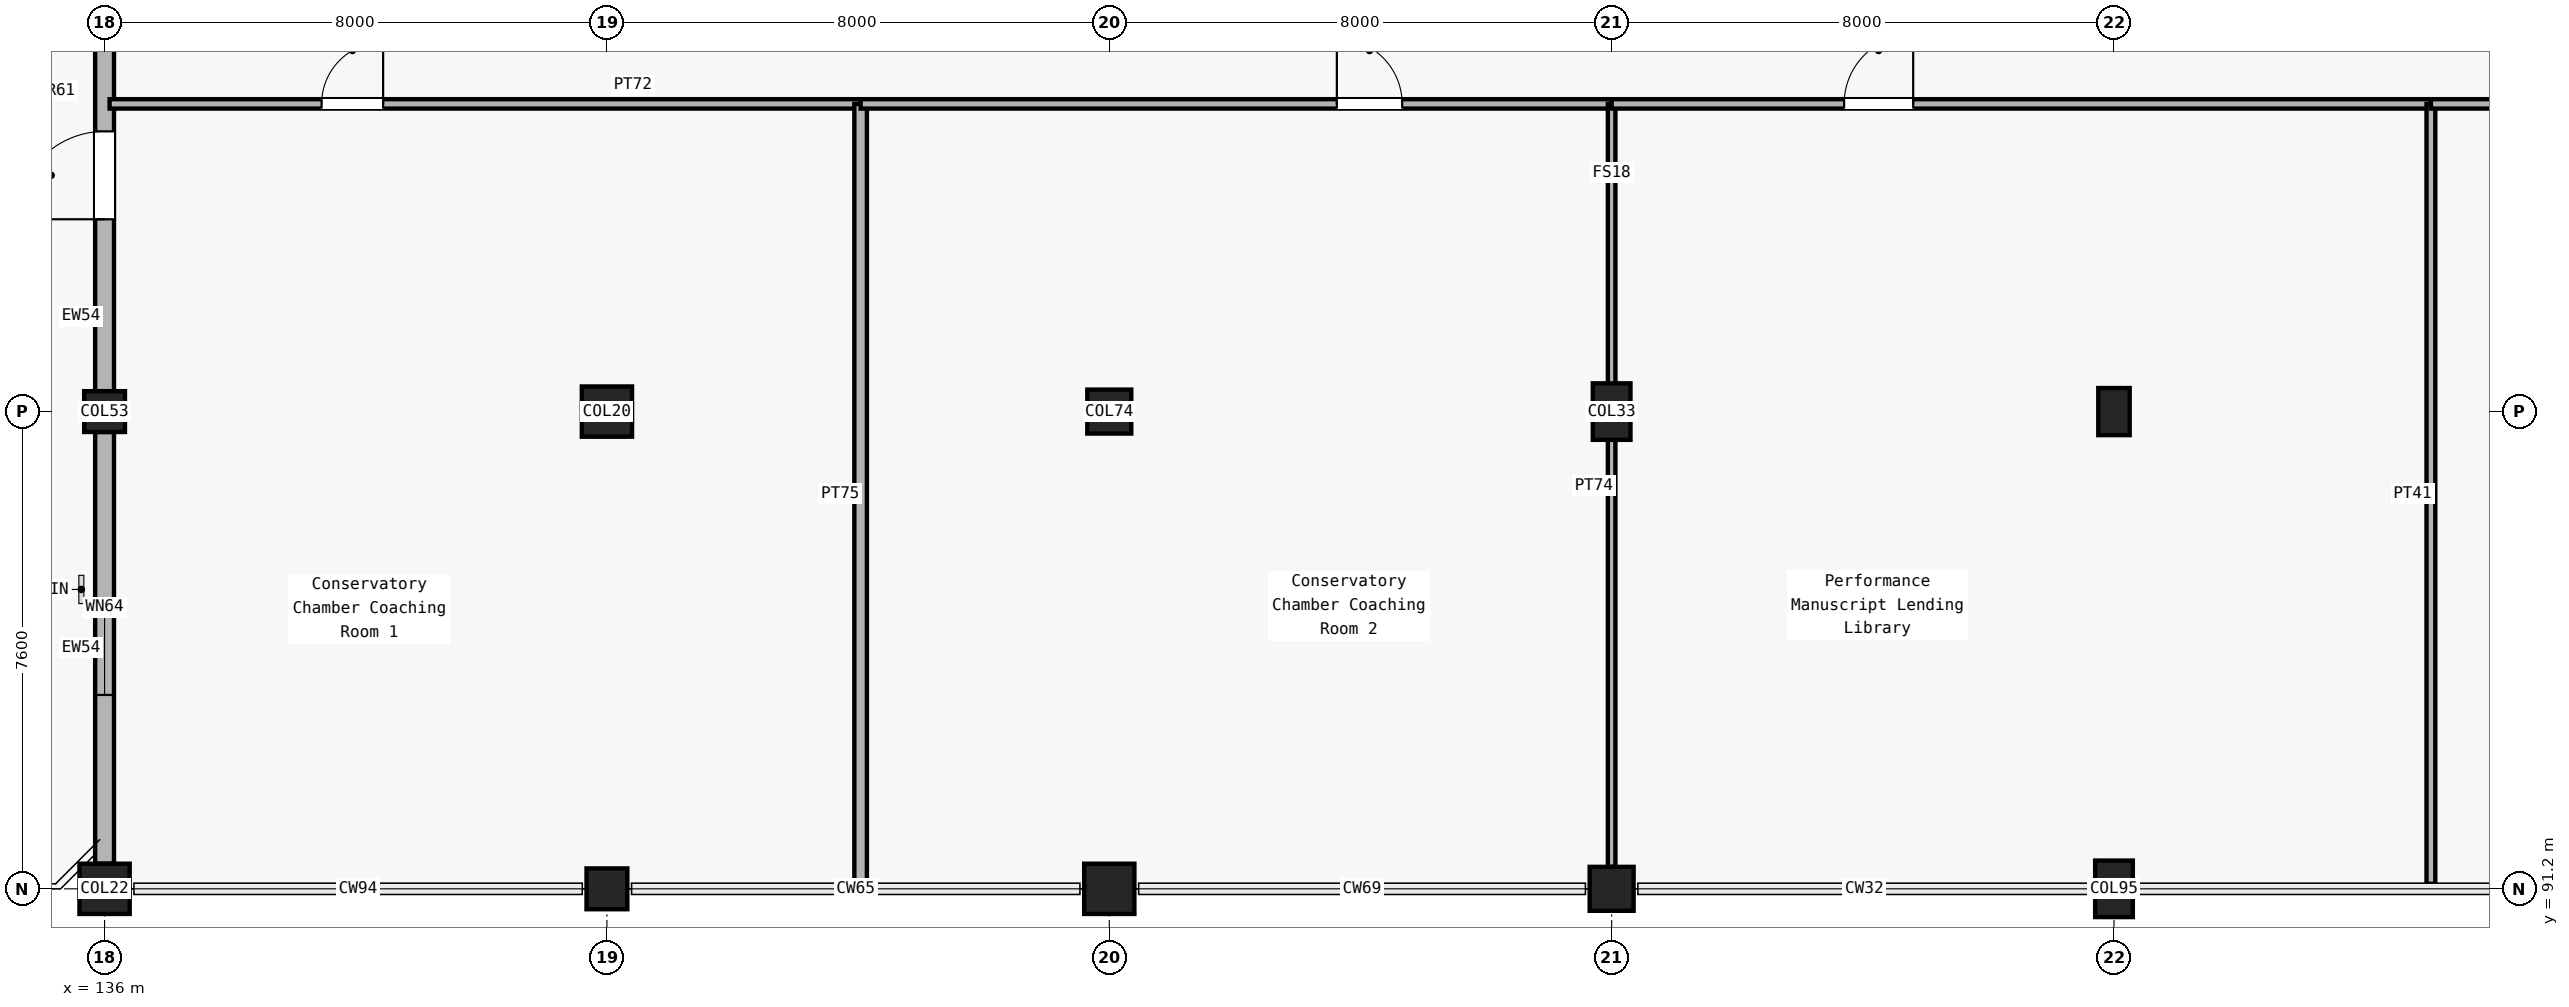
"""IFC4 building model, lengths in metres.
Left out: names, types, materials, properties, quantities, classifications, styles, units other than length and angle.
Written with IfcOpenShell. Run it as: python <this file> out.ifc"""

import sys

from ifc_helpers import new_model, si_unit, direction, frame, frame_2d, origin, origin_2d, place, context, subcontext, project, spatial, rectangle, circle, extrude, element, fill, save


model = new_model("IFC4")
c1 = context("Model", 3, precision=1e-05, world=origin(), true_north=direction((0.0, 1.0)))
c2 = subcontext(c1, "Body", "Model", "MODEL_VIEW")
j1 = project(units=[si_unit("LENGTHUNIT", "METRE"), si_unit("PLANEANGLEUNIT", "RADIAN")], contexts=[c1])
p1 = place(None, origin())
s1 = spatial("IfcSite", under=j1, at=p1, CompositionType="ELEMENT")
p2 = place(p1, origin())
s2 = spatial("IfcBuilding", under=s1, at=p2, CompositionType="ELEMENT")
p3 = place(p2, frame((0.0, 0.0, 15.0)))
s3 = spatial("IfcBuildingStorey", under=s2, at=p3, CompositionType="ELEMENT", Elevation=15.0)
p4 = place(p3, frame((136.0, 91.2, 0.0), z_axis=(0.0, 0.0, 1.0), x_axis=(1.0, 0.0, 0.0)))
e1 = element("IfcColumn", 1, at=p4, inside=s3, PredefinedType="COLUMN", context=c2, shape_type="SweptSolid", body=[
    extrude(circle(Radius=0.4, at=origin_2d()), origin(), (0.0, 0.0, 1.0), 4.8),
])
for number, where, z_axis, x_axis in (
    (2, (136.0, 98.8, 0.0), (0.0, 0.0, 1.0), (1.0, 0.0, 0.0)),
    (3, (144.0, 91.2, 0.0), (0.0, 0.0, 1.0), (1.0, 0.0, 0.0)),
):
    element("IfcColumn", number, at=place(p3, frame(where, z_axis=z_axis, x_axis=x_axis)), inside=s3, PredefinedType="COLUMN", context=c2, shape_type="SweptSolid", body=[
        extrude(circle(Radius=0.325, at=origin_2d()), origin(), (0.0, 0.0, 1.0), 4.8),
    ])
for number, where, z_axis, x_axis in (
    (4, (144.0, 98.8, 0.0), (0.0, 0.0, 1.0), (1.0, 0.0, 0.0)),
    (5, (152.0, 91.2, 0.0), (0.0, 0.0, 1.0), (1.0, 0.0, 0.0)),
):
    element("IfcColumn", number, at=place(p3, frame(where, z_axis=z_axis, x_axis=x_axis)), inside=s3, PredefinedType="COLUMN", context=c2, shape_type="SweptSolid", body=[
        extrude(rectangle(XDim=0.8, YDim=0.8, at=origin_2d()), origin(), (0.0, 0.0, 1.0), 4.8),
    ])
for number, where, z_axis, x_axis in (
    (6, (152.0, 98.8, 0.0), (0.0, 0.0, 1.0), (1.0, 0.0, 0.0)),
    (7, (160.0, 91.2, 0.0), (0.0, 0.0, 1.0), (1.0, 0.0, 0.0)),
):
    element("IfcColumn", number, at=place(p3, frame(where, z_axis=z_axis, x_axis=x_axis)), inside=s3, PredefinedType="COLUMN", context=c2, shape_type="SweptSolid", body=[
        extrude(rectangle(XDim=0.7, YDim=0.7, at=origin_2d()), origin(), (0.0, 0.0, 1.0), 4.8),
    ])
for number, where, z_axis, x_axis in (
    (8, (160.0, 98.8, 0.0), (0.0, 0.0, 1.0), (1.0, 0.0, 0.0)),
    (9, (168.0, 91.2, 0.0), (0.0, 0.0, 1.0), (1.0, 0.0, 0.0)),
):
    element("IfcColumn", number, at=place(p3, frame(where, z_axis=z_axis, x_axis=x_axis)), inside=s3, PredefinedType="COLUMN", context=c2, shape_type="SweptSolid", body=[
        extrude(rectangle(XDim=0.6, YDim=0.9, at=origin_2d()), origin(), (0.0, 0.0, 1.0), 4.8),
    ])
p5 = place(p3, frame((168.0, 98.8, 0.0), z_axis=(0.0, 0.0, 1.0), x_axis=(1.0, 0.0, 0.0)))
e10 = element("IfcColumn", 10, at=p5, inside=s3, PredefinedType="COLUMN", context=c2, shape_type="SweptSolid", body=[
    extrude(rectangle(XDim=0.5, YDim=0.75, at=origin_2d()), origin(), (0.0, 0.0, 1.0), 4.8),
])
p6 = place(p3, frame((136.0, 91.6, 0.0), z_axis=(0.0, 0.0, 1.0), x_axis=(0.0, 1.0, 0.0)))
e11 = element("IfcWall", 11, at=p6, inside=s3, PredefinedType="SOLIDWALL", context=c2, shape_type="SweptSolid", body=[
    extrude(rectangle(XDim=6.875, YDim=0.3, at=frame_2d((3.438, 0.0))), origin(), (0.0, 0.0, 1.0), 3.87),
])
p7 = place(p6, frame((2.688, 0.0, 0.95)))
e12 = element("IfcOpeningElement", 12, at=p7, cuts=e11, PredefinedType="OPENING", context=c2, shape_type="SweptSolid", body=[
    extrude(rectangle(XDim=1.5, YDim=1.8, at=frame_2d((0.75, 0.9))), frame((0.0, 0.16, 0.0), z_axis=(0.0, -1.0, 0.0), x_axis=(1.0, 0.0, 0.0)), (0.0, 0.0, 1.0), 0.32),
])
p8 = place(p3, frame((136.0, 99.125, 0.0), z_axis=(0.0, 0.0, 1.0), x_axis=(0.0, 1.0, 0.0)))
e13 = element("IfcWall", 13, at=p8, inside=s3, PredefinedType="SOLIDWALL", context=c2, shape_type="SweptSolid", body=[
    extrude(rectangle(XDim=6.875, YDim=0.3, at=frame_2d((3.438, 0.0))), origin(), (0.0, 0.0, 1.0), 3.57),
])
p9 = place(p8, frame((2.738, 0.0, 0.0)))
e14 = element("IfcOpeningElement", 14, at=p9, cuts=e13, PredefinedType="OPENING", context=c2, shape_type="SweptSolid", body=[
    extrude(rectangle(XDim=1.4, YDim=2.2, at=frame_2d((0.7, 1.1))), frame((0.0, 0.16, 0.0), z_axis=(0.0, -1.0, 0.0), x_axis=(1.0, 0.0, 0.0)), (0.0, 0.0, 1.0), 0.32),
])
p10 = place(p3, frame((136.08, 103.7, 0.0), z_axis=(0.0, 0.0, 1.0), x_axis=(1.0, 0.0, 0.0)))
e15 = element("IfcWall", 15, at=p10, inside=s3, PredefinedType="PARTITIONING", context=c2, shape_type="SweptSolid", body=[
    extrude(rectangle(XDim=11.96, YDim=0.15, at=frame_2d((5.98, 0.0))), origin(), (0.0, 0.0, 1.0), 3.755),
])
p11 = place(p10, frame((3.376, 0.0, 0.0)))
e16 = element("IfcOpeningElement", 16, at=p11, cuts=e15, PredefinedType="OPENING", context=c2, shape_type="SweptSolid", body=[
    extrude(rectangle(XDim=0.98, YDim=2.15, at=frame_2d((0.49, 1.075))), frame((0.0, 0.085, 0.0), z_axis=(0.0, -1.0, 0.0), x_axis=(1.0, 0.0, 0.0)), (0.0, 0.0, 1.0), 0.17),
])
p12 = place(p3, frame((148.04, 91.28, 0.0), z_axis=(0.0, 0.0, 1.0), x_axis=(0.0, 1.0, 0.0)))
e17 = element("IfcWall", 17, at=p12, inside=s3, PredefinedType="PARTITIONING", context=c2, shape_type="SweptSolid", body=[
    extrude(rectangle(XDim=12.42, YDim=0.2, at=frame_2d((6.21, 0.0))), origin(), (0.0, 0.0, 1.0), 3.605),
])
p13 = place(p3, frame((148.04, 103.7, 0.0), z_axis=(0.0, 0.0, 1.0), x_axis=(1.0, 0.0, 0.0)))
e18 = element("IfcWall", 18, at=p13, inside=s3, PredefinedType="PARTITIONING", context=c2, shape_type="SweptSolid", body=[
    extrude(rectangle(XDim=11.96, YDim=0.15, at=frame_2d((5.98, 0.0))), origin(), (0.0, 0.0, 1.0), 3.705),
])
p14 = place(p13, frame((7.584, 0.0, 0.0)))
e19 = element("IfcOpeningElement", 19, at=p14, cuts=e18, PredefinedType="OPENING", context=c2, shape_type="SweptSolid", body=[
    extrude(rectangle(XDim=1.04, YDim=2.15, at=frame_2d((0.52, 1.075))), frame((0.0, 0.085, 0.0), z_axis=(0.0, -1.0, 0.0), x_axis=(1.0, 0.0, 0.0)), (0.0, 0.0, 1.0), 0.17),
])
p15 = place(p3, frame((160.0, 91.55, 0.0), z_axis=(0.0, 0.0, 1.0), x_axis=(0.0, 1.0, 0.0)))
e20 = element("IfcWall", 20, at=p15, inside=s3, PredefinedType="PARTITIONING", context=c2, shape_type="SweptSolid", body=[
    extrude(rectangle(XDim=12.15, YDim=0.12, at=frame_2d((6.075, 0.0))), origin(), (0.0, 0.0, 1.0), 3.705),
])
p16 = place(p3, frame((160.0, 103.7, 0.0), z_axis=(0.0, 0.0, 1.0), x_axis=(1.0, 0.0, 0.0)))
e21 = element("IfcWall", 21, at=p16, inside=s3, PredefinedType="PARTITIONING", context=c2, shape_type="SweptSolid", body=[
    extrude(rectangle(XDim=13.047, YDim=0.15, at=frame_2d((6.523, 0.0))), origin(), (0.0, 0.0, 1.0), 3.855),
])
p17 = place(p16, frame((3.702, 0.0, 0.0)))
e22 = element("IfcOpeningElement", 22, at=p17, cuts=e21, PredefinedType="OPENING", context=c2, shape_type="SweptSolid", body=[
    extrude(rectangle(XDim=1.1, YDim=2.15, at=frame_2d((0.55, 1.075))), frame((0.0, 0.085, 0.0), z_axis=(0.0, -1.0, 0.0), x_axis=(1.0, 0.0, 0.0)), (0.0, 0.0, 1.0), 0.17),
])
p18 = place(p3, frame((173.047, 91.28, 0.0), z_axis=(0.0, 0.0, 1.0), x_axis=(0.0, 1.0, 0.0)))
e23 = element("IfcWall", 23, at=p18, inside=s3, PredefinedType="PARTITIONING", context=c2, shape_type="SweptSolid", body=[
    extrude(rectangle(XDim=12.42, YDim=0.14, at=frame_2d((6.21, 0.0))), origin(), (0.0, 0.0, 1.0), 3.78),
])
p19 = place(p3, frame((173.047, 103.7, 0.0), z_axis=(0.0, 0.0, 1.0), x_axis=(1.0, 0.0, 0.0)))
e24 = element("IfcWall", 24, at=p19, inside=s3, PredefinedType="PARTITIONING", context=c2, shape_type="SweptSolid", body=[
    extrude(rectangle(XDim=10.873, YDim=0.15, at=frame_2d((5.437, 0.0))), origin(), (0.0, 0.0, 1.0), 3.78),
])
p20 = place(p19, frame((6.823, 0.0, 0.0)))
e25 = element("IfcOpeningElement", 25, at=p20, cuts=e24, PredefinedType="OPENING", context=c2, shape_type="SweptSolid", body=[
    extrude(rectangle(XDim=1.22, YDim=2.15, at=frame_2d((0.61, 1.075))), frame((0.0, 0.085, 0.0), z_axis=(0.0, -1.0, 0.0), x_axis=(1.0, 0.0, 0.0)), (0.0, 0.0, 1.0), 0.17),
])
p21 = place(p7, origin())
e26 = element("IfcWindow", 26, at=p21, inside=s3, PartitioningType="SINGLE_PANEL", PredefinedType="WINDOW", context=c2, shape_type="SweptSolid", body=[
    extrude(rectangle(XDim=1.5, YDim=1.8, at=frame_2d((0.75, 0.9))), frame((0.0, 0.03, 0.0), z_axis=(0.0, -1.0, 0.0), x_axis=(1.0, 0.0, 0.0)), (0.0, 0.0, 1.0), 0.06),
])
fill(e12, e26)
p22 = place(p9, origin())
e27 = element("IfcDoor", 27, at=p22, inside=s3, OperationType="SINGLE_SWING_LEFT", PredefinedType="DOOR", context=c2, shape_type="SweptSolid", body=[
    extrude(rectangle(XDim=1.4, YDim=2.2, at=frame_2d((0.7, 1.1))), frame((0.0, 0.025, 0.0), z_axis=(0.0, -1.0, 0.0), x_axis=(1.0, 0.0, 0.0)), (0.0, 0.0, 1.0), 0.05),
])
fill(e14, e27)
p23 = place(p11, origin())
e28 = element("IfcDoor", 28, at=p23, inside=s3, OperationType="SINGLE_SWING_RIGHT", PredefinedType="DOOR", context=c2, shape_type="SweptSolid", body=[
    extrude(rectangle(XDim=0.98, YDim=2.15, at=frame_2d((0.49, 1.075))), frame((0.0, 0.025, 0.0), z_axis=(0.0, -1.0, 0.0), x_axis=(1.0, 0.0, 0.0)), (0.0, 0.0, 1.0), 0.05),
])
fill(e16, e28)
p24 = place(p14, origin())
e29 = element("IfcDoor", 29, at=p24, inside=s3, OperationType="SINGLE_SWING_LEFT", PredefinedType="DOOR", context=c2, shape_type="SweptSolid", body=[
    extrude(rectangle(XDim=1.04, YDim=2.15, at=frame_2d((0.52, 1.075))), frame((0.0, 0.025, 0.0), z_axis=(0.0, -1.0, 0.0), x_axis=(1.0, 0.0, 0.0)), (0.0, 0.0, 1.0), 0.05),
])
fill(e19, e29)
p25 = place(p17, origin())
e30 = element("IfcDoor", 30, at=p25, inside=s3, OperationType="SINGLE_SWING_RIGHT", PredefinedType="DOOR", context=c2, shape_type="SweptSolid", body=[
    extrude(rectangle(XDim=1.1, YDim=2.15, at=frame_2d((0.55, 1.075))), frame((0.0, 0.025, 0.0), z_axis=(0.0, -1.0, 0.0), x_axis=(1.0, 0.0, 0.0)), (0.0, 0.0, 1.0), 0.05),
])
fill(e22, e30)
save(model, sys.argv[1])
